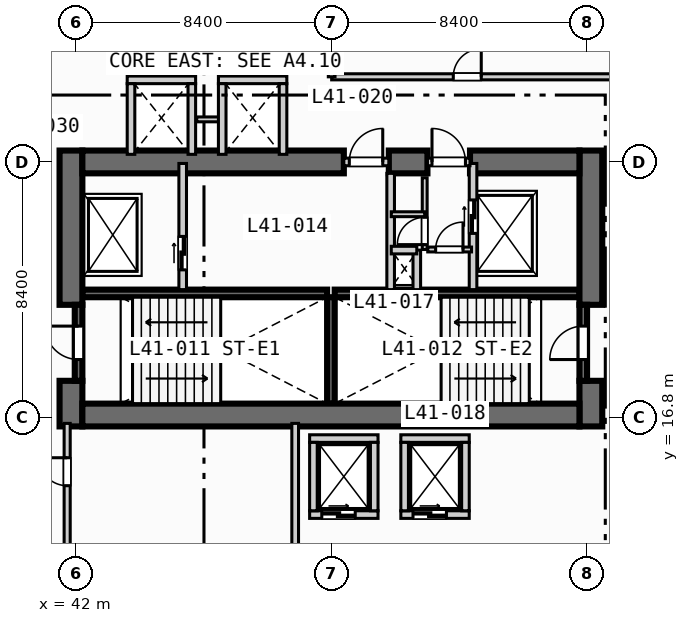
"""IFC4 building model, lengths in metres.
Left out: names, types, materials, properties, quantities, classifications, styles, units other than length and angle.
Written with IfcOpenShell. Run it as: python <this file> out.ifc"""

import sys

from ifc_helpers import new_model, si_unit, direction, frame, frame_2d, origin, place, context, subcontext, project, spatial, rectangle, extrude, element, fill, save


model = new_model("IFC4")
c1 = context("Model", 3, precision=1e-05, world=origin(), true_north=direction((0.0, 1.0)))
c2 = subcontext(c1, "Body", "Model", "MODEL_VIEW")
j1 = project(units=[si_unit("LENGTHUNIT", "METRE"), si_unit("PLANEANGLEUNIT", "RADIAN")], contexts=[c1])
p1 = place(None, origin())
s1 = spatial("IfcSite", under=j1, at=p1, CompositionType="ELEMENT")
p2 = place(p1, origin())
s2 = spatial("IfcBuilding", under=s1, at=p2, CompositionType="ELEMENT")
p3 = place(p2, frame((0.0, 0.0, 171.7)))
s3 = spatial("IfcBuildingStorey", under=s2, at=p3, CompositionType="ELEMENT", Elevation=171.7)
for number, where, z_axis, x_axis in (
    (1, (42.2, 20.875, 0.0), (0.0, 0.0, 1.0), (1.0, 0.0, 0.0)),
    (2, (50.5, 20.875, 0.0), (0.0, 0.0, 1.0), (1.0, 0.0, 0.0)),
):
    element("IfcWall", number, at=place(p3, frame(where, z_axis=z_axis, x_axis=x_axis)), inside=s3, PredefinedType="SOLIDWALL", context=c2, shape_type="SweptSolid", body=[
        extrude(rectangle(XDim=8.05, YDim=0.25, at=frame_2d((4.025, 0.0))), origin(), (0.0, 0.0, 1.0), 3.47),
    ])
p4 = place(p3, frame((50.375, 17.25, 0.0), z_axis=(0.0, 0.0, 1.0), x_axis=(0.0, 1.0, 0.0)))
e3 = element("IfcWall", 3, at=p4, inside=s3, PredefinedType="SOLIDWALL", context=c2, shape_type="SweptSolid", body=[
    extrude(rectangle(XDim=3.5, YDim=0.25, at=frame_2d((1.75, 0.0))), origin(), (0.0, 0.0, 1.0), 3.47),
])
p5 = place(p3, frame((41.825, 16.5, 0.0), z_axis=(0.0, 0.0, 1.0), x_axis=(0.0, 1.0, 0.0)))
e4 = element("IfcWall", 4, at=p5, inside=s3, PredefinedType="SHEAR", context=c2, shape_type="SweptSolid", body=[
    extrude(rectangle(XDim=1.5, YDim=0.75, at=frame_2d((0.75, 0.0))), origin(), (0.0, 0.0, 1.0), 3.47),
])
p6 = place(p3, frame((41.825, 20.5, 0.0), z_axis=(0.0, 0.0, 1.0), x_axis=(0.0, 1.0, 0.0)))
e5 = element("IfcWall", 5, at=p6, inside=s3, PredefinedType="SHEAR", context=c2, shape_type="SweptSolid", body=[
    extrude(rectangle(XDim=5.075, YDim=0.75, at=frame_2d((2.538, 0.0))), origin(), (0.0, 0.0, 1.0), 3.47),
])
p7 = place(p3, frame((58.925, 16.5, 0.0), z_axis=(0.0, 0.0, 1.0), x_axis=(0.0, 1.0, 0.0)))
e6 = element("IfcWall", 6, at=p7, inside=s3, PredefinedType="SHEAR", context=c2, shape_type="SweptSolid", body=[
    extrude(rectangle(XDim=1.5, YDim=0.75, at=frame_2d((0.75, 0.0))), origin(), (0.0, 0.0, 1.0), 3.47),
])
p8 = place(p3, frame((58.925, 20.5, 0.0), z_axis=(0.0, 0.0, 1.0), x_axis=(0.0, 1.0, 0.0)))
e7 = element("IfcWall", 7, at=p8, inside=s3, PredefinedType="SHEAR", context=c2, shape_type="SweptSolid", body=[
    extrude(rectangle(XDim=5.075, YDim=0.75, at=frame_2d((2.538, 0.0))), origin(), (0.0, 0.0, 1.0), 3.47),
])
p9 = place(p3, frame((42.2, 16.875, 0.0), z_axis=(0.0, 0.0, 1.0), x_axis=(1.0, 0.0, 0.0)))
e8 = element("IfcWall", 8, at=p9, inside=s3, PredefinedType="SHEAR", context=c2, shape_type="SweptSolid", body=[
    extrude(rectangle(XDim=16.35, YDim=0.75, at=frame_2d((8.175, 0.0))), origin(), (0.0, 0.0, 1.0), 3.47),
])
p10 = place(p3, frame((42.2, 25.2, 0.0), z_axis=(0.0, 0.0, 1.0), x_axis=(1.0, 0.0, 0.0)))
e9 = element("IfcWall", 9, at=p10, inside=s3, PredefinedType="SHEAR", context=c2, shape_type="SweptSolid", body=[
    extrude(rectangle(XDim=8.6, YDim=0.75, at=frame_2d((4.3, 0.0))), origin(), (0.0, 0.0, 1.0), 3.47),
])
p11 = place(p3, frame((52.28, 25.2, 0.0), z_axis=(0.0, 0.0, 1.0), x_axis=(1.0, 0.0, 0.0)))
e10 = element("IfcWall", 10, at=p11, inside=s3, PredefinedType="SHEAR", context=c2, shape_type="SweptSolid", body=[
    extrude(rectangle(XDim=1.27, YDim=0.75, at=frame_2d((0.635, 0.0))), origin(), (0.0, 0.0, 1.0), 3.47),
])
p12 = place(p3, frame((54.95, 25.2, 0.0), z_axis=(0.0, 0.0, 1.0), x_axis=(1.0, 0.0, 0.0)))
e11 = element("IfcWall", 11, at=p12, inside=s3, PredefinedType="SHEAR", context=c2, shape_type="SweptSolid", body=[
    extrude(rectangle(XDim=3.6, YDim=0.75, at=frame_2d((1.8, 0.0))), origin(), (0.0, 0.0, 1.0), 3.47),
])
p13 = place(p3, frame((42.075, 18.0, 0.0), z_axis=(0.0, 0.0, 1.0), x_axis=(0.0, 1.0, 0.0)))
e12 = element("IfcWall", 12, at=p13, inside=s3, PredefinedType="SOLIDWALL", context=c2, shape_type="SweptSolid", body=[
    extrude(rectangle(XDim=2.5, YDim=0.25, at=frame_2d((1.25, 0.0))), origin(), (0.0, 0.0, 1.0), 3.47),
])
p14 = place(p13, frame((0.7, 0.0, 0.0)))
e13 = element("IfcOpeningElement", 13, at=p14, cuts=e12, PredefinedType="OPENING", context=c2, shape_type="SweptSolid", body=[
    extrude(rectangle(XDim=1.1, YDim=2.15, at=frame_2d((0.55, 1.075))), frame((0.0, 0.135, 0.0), z_axis=(0.0, -1.0, 0.0), x_axis=(1.0, 0.0, 0.0)), (0.0, 0.0, 1.0), 0.27),
])
p15 = place(p3, frame((58.675, 18.0, 0.0), z_axis=(0.0, 0.0, 1.0), x_axis=(0.0, 1.0, 0.0)))
e14 = element("IfcWall", 14, at=p15, inside=s3, PredefinedType="SOLIDWALL", context=c2, shape_type="SweptSolid", body=[
    extrude(rectangle(XDim=2.5, YDim=0.25, at=frame_2d((1.25, 0.0))), origin(), (0.0, 0.0, 1.0), 3.47),
])
p16 = place(p15, frame((0.7, 0.0, 0.0)))
e15 = element("IfcOpeningElement", 15, at=p16, cuts=e14, PredefinedType="OPENING", context=c2, shape_type="SweptSolid", body=[
    extrude(rectangle(XDim=1.1, YDim=2.15, at=frame_2d((0.55, 1.075))), frame((0.0, 0.135, 0.0), z_axis=(0.0, -1.0, 0.0), x_axis=(1.0, 0.0, 0.0)), (0.0, 0.0, 1.0), 0.27),
])
p17 = place(p3, frame((45.5, 21.0, 0.0), z_axis=(0.0, 0.0, 1.0), x_axis=(0.0, 1.0, 0.0)))
e16 = element("IfcWall", 16, at=p17, inside=s3, PredefinedType="SOLIDWALL", context=c2, shape_type="SweptSolid", body=[
    extrude(rectangle(XDim=4.15, YDim=0.25, at=frame_2d((2.075, 0.0))), origin(), (0.0, 0.0, 1.0), 3.47),
])
p18 = place(p17, frame((0.65, 0.0, 0.0)))
e17 = element("IfcOpeningElement", 17, at=p18, cuts=e16, PredefinedType="OPENING", context=c2, shape_type="SweptSolid", body=[
    extrude(rectangle(XDim=1.1, YDim=2.15, at=frame_2d((0.55, 1.075))), frame((0.0, 0.135, 0.0), z_axis=(0.0, -1.0, 0.0), x_axis=(1.0, 0.0, 0.0)), (0.0, 0.0, 1.0), 0.27),
])
p19 = place(p3, frame((50.8, 25.2, 0.0), z_axis=(0.0, 0.0, 1.0), x_axis=(1.0, 0.0, 0.0)))
e18 = element("IfcWall", 18, at=p19, inside=s3, PredefinedType="SOLIDWALL", context=c2, shape_type="SweptSolid", body=[
    extrude(rectangle(XDim=1.48, YDim=0.25, at=frame_2d((0.74, 0.0))), origin(), (0.0, 0.0, 1.0), 3.47),
])
p20 = place(p19, frame((0.18, 0.0, 0.0)))
e19 = element("IfcOpeningElement", 19, at=p20, cuts=e18, PredefinedType="OPENING", context=c2, shape_type="SweptSolid", body=[
    extrude(rectangle(XDim=1.1, YDim=2.15, at=frame_2d((0.55, 1.075))), frame((0.0, 0.135, 0.0), z_axis=(0.0, -1.0, 0.0), x_axis=(1.0, 0.0, 0.0)), (0.0, 0.0, 1.0), 0.27),
])
p21 = place(p3, frame((52.34, 21.0, 0.0), z_axis=(0.0, 0.0, 1.0), x_axis=(0.0, 1.0, 0.0)))
e20 = element("IfcWall", 20, at=p21, inside=s3, PredefinedType="SOLIDWALL", context=c2, shape_type="SweptSolid", body=[
    extrude(rectangle(XDim=3.825, YDim=0.25, at=frame_2d((1.913, 0.0))), origin(), (0.0, 0.0, 1.0), 3.47),
])
p22 = place(p3, frame((55.05, 21.0, 0.0), z_axis=(0.0, 0.0, 1.0), x_axis=(0.0, 1.0, 0.0)))
e21 = element("IfcWall", 21, at=p22, inside=s3, PredefinedType="SOLIDWALL", context=c2, shape_type="SweptSolid", body=[
    extrude(rectangle(XDim=4.15, YDim=0.25, at=frame_2d((2.075, 0.0))), origin(), (0.0, 0.0, 1.0), 3.47),
])
p23 = place(p22, frame((1.85, 0.0, 0.0)))
e22 = element("IfcOpeningElement", 22, at=p23, cuts=e21, PredefinedType="OPENING", context=c2, shape_type="SweptSolid", body=[
    extrude(rectangle(XDim=1.1, YDim=2.15, at=frame_2d((0.55, 1.075))), frame((0.0, 0.135, 0.0), z_axis=(0.0, -1.0, 0.0), x_axis=(1.0, 0.0, 0.0)), (0.0, 0.0, 1.0), 0.27),
])
p24 = place(p3, frame((53.55, 25.2, 0.0), z_axis=(0.0, 0.0, 1.0), x_axis=(1.0, 0.0, 0.0)))
e23 = element("IfcWall", 23, at=p24, inside=s3, PredefinedType="SOLIDWALL", context=c2, shape_type="SweptSolid", body=[
    extrude(rectangle(XDim=1.4, YDim=0.25, at=frame_2d((0.7, 0.0))), origin(), (0.0, 0.0, 1.0), 3.47),
])
p25 = place(p24, frame((0.15, 0.0, 0.0)))
e24 = element("IfcOpeningElement", 24, at=p25, cuts=e23, PredefinedType="OPENING", context=c2, shape_type="SweptSolid", body=[
    extrude(rectangle(XDim=1.1, YDim=2.15, at=frame_2d((0.55, 1.075))), frame((0.0, 0.135, 0.0), z_axis=(0.0, -1.0, 0.0), x_axis=(1.0, 0.0, 0.0)), (0.0, 0.0, 1.0), 0.27),
])
p26 = place(p3, frame((53.2, 21.0, 0.0), z_axis=(0.0, 0.0, 1.0), x_axis=(0.0, 1.0, 0.0)))
e25 = element("IfcWall", 25, at=p26, inside=s3, PredefinedType="SOLIDWALL", context=c2, shape_type="SweptSolid", body=[
    extrude(rectangle(XDim=1.3, YDim=0.25, at=frame_2d((0.65, 0.0))), origin(), (0.0, 0.0, 1.0), 3.47),
])
p27 = place(p3, frame((52.36, 22.3, 0.0), z_axis=(0.0, 0.0, 1.0), x_axis=(1.0, 0.0, 0.0)))
e26 = element("IfcWall", 26, at=p27, inside=s3, PredefinedType="SOLIDWALL", context=c2, shape_type="SweptSolid", body=[
    extrude(rectangle(XDim=0.84, YDim=0.25, at=frame_2d((0.42, 0.0))), origin(), (0.0, 0.0, 1.0), 3.47),
])
p28 = place(p3, frame((53.56, 22.32, 0.0), z_axis=(0.0, 0.0, 1.0), x_axis=(1.0, 0.0, 0.0)))
e27 = element("IfcWall", 27, at=p28, inside=s3, PredefinedType="PARTITIONING", context=c2, shape_type="SweptSolid", body=[
    extrude(rectangle(XDim=1.44, YDim=0.16, at=frame_2d((0.72, 0.0))), origin(), (0.0, 0.0, 1.0), 3.47),
])
p29 = place(p28, frame((0.26, 0.0, 0.0)))
e28 = element("IfcOpeningElement", 28, at=p29, cuts=e27, PredefinedType="OPENING", context=c2, shape_type="SweptSolid", body=[
    extrude(rectangle(XDim=0.9, YDim=2.1, at=frame_2d((0.45, 1.05))), frame((0.0, 0.09, 0.0), z_axis=(0.0, -1.0, 0.0), x_axis=(1.0, 0.0, 0.0)), (0.0, 0.0, 1.0), 0.18),
])
p30 = place(p3, frame((53.46, 22.32, 0.0), z_axis=(0.0, 0.0, 1.0), x_axis=(0.0, 1.0, 0.0)))
e29 = element("IfcWall", 29, at=p30, inside=s3, PredefinedType="PARTITIONING", context=c2, shape_type="SweptSolid", body=[
    extrude(rectangle(XDim=2.36, YDim=0.16, at=frame_2d((1.18, 0.0))), origin(), (0.0, 0.0, 1.0), 3.47),
])
p31 = place(p30, frame((0.16, 0.0, 0.0)))
e30 = element("IfcOpeningElement", 30, at=p31, cuts=e29, PredefinedType="OPENING", context=c2, shape_type="SweptSolid", body=[
    extrude(rectangle(XDim=0.9, YDim=2.1, at=frame_2d((0.45, 1.05))), frame((0.0, 0.09, 0.0), z_axis=(0.0, -1.0, 0.0), x_axis=(1.0, 0.0, 0.0)), (0.0, 0.0, 1.0), 0.18),
])
p32 = place(p3, frame((52.36, 23.48, 0.0), z_axis=(0.0, 0.0, 1.0), x_axis=(1.0, 0.0, 0.0)))
e31 = element("IfcWall", 31, at=p32, inside=s3, PredefinedType="PARTITIONING", context=c2, shape_type="SweptSolid", body=[
    extrude(rectangle(XDim=1.1, YDim=0.16, at=frame_2d((0.55, 0.0))), origin(), (0.0, 0.0, 1.0), 3.47),
])
p33 = place(p3, frame((49.675, 13.6, 0.0), z_axis=(0.0, 0.0, 1.0), x_axis=(1.0, 0.0, 0.0)))
e32 = element("IfcWall", 32, at=p33, inside=s3, PredefinedType="SOLIDWALL", context=c2, shape_type="SweptSolid", body=[
    extrude(rectangle(XDim=2.25, YDim=0.25, at=frame_2d((1.125, 0.0))), origin(), (0.0, 0.0, 1.0), 3.47),
])
p34 = place(p33, frame((0.4, 0.0, 0.0)))
e33 = element("IfcOpeningElement", 33, at=p34, cuts=e32, PredefinedType="OPENING", context=c2, shape_type="SweptSolid", body=[
    extrude(rectangle(XDim=1.1, YDim=2.15, at=frame_2d((0.55, 1.075))), frame((0.0, 0.135, 0.0), z_axis=(0.0, -1.0, 0.0), x_axis=(1.0, 0.0, 0.0)), (0.0, 0.0, 1.0), 0.27),
])
for number, where, z_axis, x_axis in (
    (34, (49.675, 16.1, 0.0), (0.0, 0.0, 1.0), (1.0, 0.0, 0.0)),
    (35, (49.8, 13.725, 0.0), (0.0, 0.0, 1.0), (0.0, 1.0, 0.0)),
    (36, (51.8, 13.725, 0.0), (0.0, 0.0, 1.0), (0.0, 1.0, 0.0)),
):
    element("IfcWall", number, at=place(p3, frame(where, z_axis=z_axis, x_axis=x_axis)), inside=s3, PredefinedType="SOLIDWALL", context=c2, shape_type="SweptSolid", body=[
        extrude(rectangle(XDim=2.25, YDim=0.25, at=frame_2d((1.125, 0.0))), origin(), (0.0, 0.0, 1.0), 3.47),
    ])
p35 = place(p3, frame((52.675, 13.6, 0.0), z_axis=(0.0, 0.0, 1.0), x_axis=(1.0, 0.0, 0.0)))
e37 = element("IfcWall", 37, at=p35, inside=s3, PredefinedType="SOLIDWALL", context=c2, shape_type="SweptSolid", body=[
    extrude(rectangle(XDim=2.25, YDim=0.25, at=frame_2d((1.125, 0.0))), origin(), (0.0, 0.0, 1.0), 3.47),
])
p36 = place(p35, frame((0.4, 0.0, 0.0)))
e38 = element("IfcOpeningElement", 38, at=p36, cuts=e37, PredefinedType="OPENING", context=c2, shape_type="SweptSolid", body=[
    extrude(rectangle(XDim=1.1, YDim=2.15, at=frame_2d((0.55, 1.075))), frame((0.0, 0.135, 0.0), z_axis=(0.0, -1.0, 0.0), x_axis=(1.0, 0.0, 0.0)), (0.0, 0.0, 1.0), 0.27),
])
for number, where, z_axis, x_axis in (
    (39, (52.675, 16.1, 0.0), (0.0, 0.0, 1.0), (1.0, 0.0, 0.0)),
    (40, (52.8, 13.725, 0.0), (0.0, 0.0, 1.0), (0.0, 1.0, 0.0)),
    (41, (54.8, 13.725, 0.0), (0.0, 0.0, 1.0), (0.0, 1.0, 0.0)),
    (42, (43.675, 27.9, 0.0), (0.0, 0.0, 1.0), (1.0, 0.0, 0.0)),
):
    element("IfcWall", number, at=place(p3, frame(where, z_axis=z_axis, x_axis=x_axis)), inside=s3, PredefinedType="SOLIDWALL", context=c2, shape_type="SweptSolid", body=[
        extrude(rectangle(XDim=2.25, YDim=0.25, at=frame_2d((1.125, 0.0))), origin(), (0.0, 0.0, 1.0), 3.47),
    ])
for number, where, z_axis, x_axis in (
    (43, (43.8, 25.45, 0.0), (0.0, 0.0, 1.0), (0.0, 1.0, 0.0)),
    (44, (45.8, 25.45, 0.0), (0.0, 0.0, 1.0), (0.0, 1.0, 0.0)),
):
    element("IfcWall", number, at=place(p3, frame(where, z_axis=z_axis, x_axis=x_axis)), inside=s3, PredefinedType="SOLIDWALL", context=c2, shape_type="SweptSolid", body=[
        extrude(rectangle(XDim=2.325, YDim=0.25, at=frame_2d((1.163, 0.0))), origin(), (0.0, 0.0, 1.0), 3.47),
    ])
p37 = place(p3, frame((45.96, 26.6, 0.0), z_axis=(0.0, 0.0, 1.0), x_axis=(1.0, 0.0, 0.0)))
e45 = element("IfcWall", 45, at=p37, inside=s3, PredefinedType="PARTITIONING", context=c2, shape_type="SweptSolid", body=[
    extrude(rectangle(XDim=0.88, YDim=0.16, at=frame_2d((0.44, 0.0))), origin(), (0.0, 0.0, 1.0), 3.47),
])
p38 = place(p3, frame((46.675, 27.9, 0.0), z_axis=(0.0, 0.0, 1.0), x_axis=(1.0, 0.0, 0.0)))
e46 = element("IfcWall", 46, at=p38, inside=s3, PredefinedType="SOLIDWALL", context=c2, shape_type="SweptSolid", body=[
    extrude(rectangle(XDim=2.25, YDim=0.25, at=frame_2d((1.125, 0.0))), origin(), (0.0, 0.0, 1.0), 3.47),
])
for number, where, z_axis, x_axis in (
    (47, (46.8, 25.45, 0.0), (0.0, 0.0, 1.0), (0.0, 1.0, 0.0)),
    (48, (48.8, 25.45, 0.0), (0.0, 0.0, 1.0), (0.0, 1.0, 0.0)),
):
    element("IfcWall", number, at=place(p3, frame(where, z_axis=z_axis, x_axis=x_axis)), inside=s3, PredefinedType="SOLIDWALL", context=c2, shape_type="SweptSolid", body=[
        extrude(rectangle(XDim=2.325, YDim=0.25, at=frame_2d((1.163, 0.0))), origin(), (0.0, 0.0, 1.0), 3.47),
    ])
p39 = place(p3, frame((41.7, 0.35, 0.0), z_axis=(0.0, 0.0, 1.0), x_axis=(0.0, 1.0, 0.0)))
e49 = element("IfcWall", 49, at=p39, inside=s3, PredefinedType="PARTITIONING", context=c2, shape_type="SweptSolid", body=[
    extrude(rectangle(XDim=16.25, YDim=0.2, at=frame_2d((8.125, 0.0))), origin(), (0.0, 0.0, 1.0), 2.82),
])
p40 = place(p39, frame((14.2, 0.0, 0.0)))
e50 = element("IfcOpeningElement", 50, at=p40, cuts=e49, PredefinedType="OPENING", context=c2, shape_type="SweptSolid", body=[
    extrude(rectangle(XDim=0.92, YDim=2.1, at=frame_2d((0.46, 1.05))), frame((0.0, 0.11, 0.0), z_axis=(0.0, -1.0, 0.0), x_axis=(1.0, 0.0, 0.0)), (0.0, 0.0, 1.0), 0.22),
])
p41 = place(p3, frame((49.2, 0.35, 0.0), z_axis=(0.0, 0.0, 1.0), x_axis=(0.0, 1.0, 0.0)))
e51 = element("IfcWall", 51, at=p41, inside=s3, PredefinedType="PARTITIONING", context=c2, shape_type="SweptSolid", body=[
    extrude(rectangle(XDim=16.25, YDim=0.22, at=frame_2d((8.125, 0.0))), origin(), (0.0, 0.0, 1.0), 3.47),
])
p42 = place(p3, frame((50.4, 28.0, 0.0), z_axis=(0.0, 0.0, 1.0), x_axis=(1.0, 0.0, 0.0)))
e52 = element("IfcWall", 52, at=p42, inside=s3, PredefinedType="PARTITIONING", context=c2, shape_type="SweptSolid", body=[
    extrude(rectangle(XDim=21.8, YDim=0.2, at=frame_2d((10.9, 0.0))), origin(), (0.0, 0.0, 1.0), 3.47),
])
p43 = place(p42, frame((4.0, 0.0, 0.0)))
e53 = element("IfcOpeningElement", 53, at=p43, cuts=e52, PredefinedType="OPENING", context=c2, shape_type="SweptSolid", body=[
    extrude(rectangle(XDim=0.92, YDim=2.1, at=frame_2d((0.46, 1.05))), frame((0.0, 0.11, 0.0), z_axis=(0.0, -1.0, 0.0), x_axis=(1.0, 0.0, 0.0)), (0.0, 0.0, 1.0), 0.22),
])
p44 = place(p3, frame((50.4, 28.0, 0.0), z_axis=(0.0, 0.0, 1.0), x_axis=(0.0, 1.0, 0.0)))
e54 = element("IfcWall", 54, at=p44, inside=s3, PredefinedType="PARTITIONING", context=c2, shape_type="SweptSolid", body=[
    extrude(rectangle(XDim=5.3, YDim=0.22, at=frame_2d((2.65, 0.0))), origin(), (0.0, 0.0, 1.0), 3.007),
])
p45 = place(p14, origin())
e55 = element("IfcDoor", 55, at=p45, inside=s3, OperationType="SINGLE_SWING_RIGHT", PredefinedType="DOOR", context=c2, shape_type="SweptSolid", body=[
    extrude(rectangle(XDim=1.1, YDim=2.15, at=frame_2d((0.55, 1.075))), frame((0.0, 0.025, 0.0), z_axis=(0.0, -1.0, 0.0), x_axis=(1.0, 0.0, 0.0)), (0.0, 0.0, 1.0), 0.05),
])
fill(e13, e55)
p46 = place(p16, origin())
e56 = element("IfcDoor", 56, at=p46, inside=s3, OperationType="SINGLE_SWING_LEFT", PredefinedType="DOOR", context=c2, shape_type="SweptSolid", body=[
    extrude(rectangle(XDim=1.1, YDim=2.15, at=frame_2d((0.55, 1.075))), frame((0.0, 0.025, 0.0), z_axis=(0.0, -1.0, 0.0), x_axis=(1.0, 0.0, 0.0)), (0.0, 0.0, 1.0), 0.05),
])
fill(e15, e56)
p47 = place(p18, origin())
e57 = element("IfcDoor", 57, at=p47, inside=s3, OperationType="SLIDING_TO_LEFT", PredefinedType="DOOR", context=c2, shape_type="SweptSolid", body=[
    extrude(rectangle(XDim=1.1, YDim=2.15, at=frame_2d((0.55, 1.075))), frame((0.0, 0.025, 0.0), z_axis=(0.0, -1.0, 0.0), x_axis=(1.0, 0.0, 0.0)), (0.0, 0.0, 1.0), 0.05),
])
fill(e17, e57)
p48 = place(p20, origin())
e58 = element("IfcDoor", 58, at=p48, inside=s3, OperationType="SINGLE_SWING_RIGHT", PredefinedType="DOOR", context=c2, shape_type="SweptSolid", body=[
    extrude(rectangle(XDim=1.1, YDim=2.15, at=frame_2d((0.55, 1.075))), frame((0.0, 0.025, 0.0), z_axis=(0.0, -1.0, 0.0), x_axis=(1.0, 0.0, 0.0)), (0.0, 0.0, 1.0), 0.05),
])
fill(e19, e58)
p49 = place(p23, origin())
e59 = element("IfcDoor", 59, at=p49, inside=s3, OperationType="SLIDING_TO_LEFT", PredefinedType="DOOR", context=c2, shape_type="SweptSolid", body=[
    extrude(rectangle(XDim=1.1, YDim=2.15, at=frame_2d((0.55, 1.075))), frame((0.0, 0.025, 0.0), z_axis=(0.0, -1.0, 0.0), x_axis=(1.0, 0.0, 0.0)), (0.0, 0.0, 1.0), 0.05),
])
fill(e22, e59)
p50 = place(p25, origin())
e60 = element("IfcDoor", 60, at=p50, inside=s3, OperationType="SINGLE_SWING_LEFT", PredefinedType="DOOR", context=c2, shape_type="SweptSolid", body=[
    extrude(rectangle(XDim=1.1, YDim=2.15, at=frame_2d((0.55, 1.075))), frame((0.0, 0.025, 0.0), z_axis=(0.0, -1.0, 0.0), x_axis=(1.0, 0.0, 0.0)), (0.0, 0.0, 1.0), 0.05),
])
fill(e24, e60)
p51 = place(p29, origin())
e61 = element("IfcDoor", 61, at=p51, inside=s3, OperationType="SINGLE_SWING_RIGHT", PredefinedType="DOOR", context=c2, shape_type="SweptSolid", body=[
    extrude(rectangle(XDim=0.9, YDim=2.1, at=frame_2d((0.45, 1.05))), frame((0.0, 0.025, 0.0), z_axis=(0.0, -1.0, 0.0), x_axis=(1.0, 0.0, 0.0)), (0.0, 0.0, 1.0), 0.05),
])
fill(e28, e61)
p52 = place(p31, origin())
e62 = element("IfcDoor", 62, at=p52, inside=s3, OperationType="SINGLE_SWING_LEFT", PredefinedType="DOOR", context=c2, shape_type="SweptSolid", body=[
    extrude(rectangle(XDim=0.9, YDim=2.1, at=frame_2d((0.45, 1.05))), frame((0.0, 0.025, 0.0), z_axis=(0.0, -1.0, 0.0), x_axis=(1.0, 0.0, 0.0)), (0.0, 0.0, 1.0), 0.05),
])
fill(e30, e62)
p53 = place(p34, origin())
e63 = element("IfcDoor", 63, at=p53, inside=s3, OperationType="SLIDING_TO_LEFT", PredefinedType="DOOR", context=c2, shape_type="SweptSolid", body=[
    extrude(rectangle(XDim=1.1, YDim=2.15, at=frame_2d((0.55, 1.075))), frame((0.0, 0.025, 0.0), z_axis=(0.0, -1.0, 0.0), x_axis=(1.0, 0.0, 0.0)), (0.0, 0.0, 1.0), 0.05),
])
fill(e33, e63)
p54 = place(p36, origin())
e64 = element("IfcDoor", 64, at=p54, inside=s3, OperationType="SLIDING_TO_LEFT", PredefinedType="DOOR", context=c2, shape_type="SweptSolid", body=[
    extrude(rectangle(XDim=1.1, YDim=2.15, at=frame_2d((0.55, 1.075))), frame((0.0, 0.025, 0.0), z_axis=(0.0, -1.0, 0.0), x_axis=(1.0, 0.0, 0.0)), (0.0, 0.0, 1.0), 0.05),
])
fill(e38, e64)
p55 = place(p40, origin())
e65 = element("IfcDoor", 65, at=p55, inside=s3, OperationType="SINGLE_SWING_RIGHT", PredefinedType="DOOR", context=c2, shape_type="SweptSolid", body=[
    extrude(rectangle(XDim=0.92, YDim=2.1, at=frame_2d((0.46, 1.05))), frame((0.0, 0.025, 0.0), z_axis=(0.0, -1.0, 0.0), x_axis=(1.0, 0.0, 0.0)), (0.0, 0.0, 1.0), 0.05),
])
fill(e50, e65)
p56 = place(p43, origin())
e66 = element("IfcDoor", 66, at=p56, inside=s3, OperationType="SINGLE_SWING_RIGHT", PredefinedType="DOOR", context=c2, shape_type="SweptSolid", body=[
    extrude(rectangle(XDim=0.92, YDim=2.1, at=frame_2d((0.46, 1.05))), frame((0.0, 0.025, 0.0), z_axis=(0.0, -1.0, 0.0), x_axis=(1.0, 0.0, 0.0)), (0.0, 0.0, 1.0), 0.05),
])
fill(e53, e66)
save(model, sys.argv[1])
